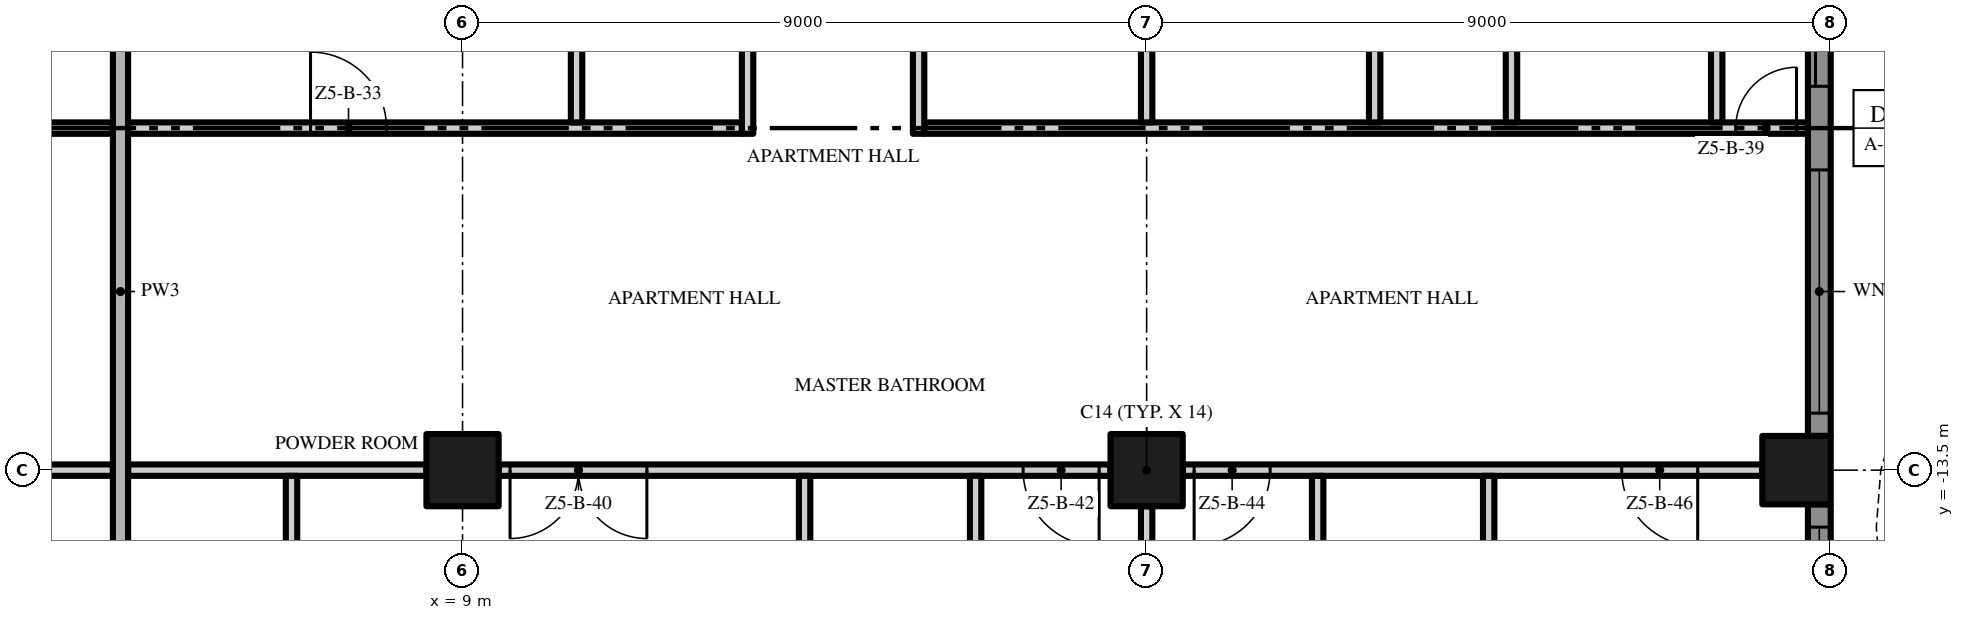
"""IFC4 building model, lengths in metres.
Left out: names, types, materials, properties, quantities, classifications, styles, units other than length and angle.
Written with IfcOpenShell. Run it as: python <this file> out.ifc"""

import sys

from ifc_helpers import new_model, si_unit, direction, frame, frame_2d, origin, origin_2d, place, context, subcontext, project, spatial, polyline, rectangle, outline, extrude, element, fill, save


model = new_model("IFC4")
c1 = context("Model", 3, precision=1e-05, world=origin(), true_north=direction((0.0, 1.0)))
c2 = subcontext(c1, "Body", "Model", "MODEL_VIEW")
j1 = project(units=[si_unit("LENGTHUNIT", "METRE"), si_unit("PLANEANGLEUNIT", "RADIAN")], contexts=[c1])
p1 = place(None, origin())
s1 = spatial("IfcSite", under=j1, at=p1, CompositionType="ELEMENT")
p2 = place(p1, origin())
s2 = spatial("IfcBuilding", under=s1, at=p2, CompositionType="ELEMENT")
p3 = place(p2, frame((0.0, 0.0, 257.8)))
s3 = spatial("IfcBuildingStorey", under=s2, at=p3, CompositionType="ELEMENT", Elevation=257.8)
p4 = place(p3, frame((18.0, -13.5, 0.0), z_axis=(0.0, 0.0, 1.0), x_axis=(1.0, 0.0, 0.0)))
e1 = element("IfcColumn", 1, at=p4, inside=s3, PredefinedType="COLUMN", context=c2, shape_type="SweptSolid", body=[
    extrude(rectangle(XDim=0.95, YDim=0.95, at=origin_2d()), origin(), (0.0, 0.0, 1.0), 3.5),
])
p5 = place(p3, frame((26.55, -13.5, 0.0), z_axis=(0.0, 0.0, 1.0), x_axis=(1.0, 0.0, 0.0)))
e2 = element("IfcColumn", 2, at=p5, inside=s3, PredefinedType="COLUMN", context=c2, shape_type="SweptSolid", body=[
    extrude(rectangle(XDim=0.9, YDim=0.9, at=origin_2d()), origin(), (0.0, 0.0, 1.0), 3.5),
])
p6 = place(p3, frame((9.0, -13.5, 0.0), z_axis=(0.0, 0.0, 1.0), x_axis=(1.0, 0.0, 0.0)))
e3 = element("IfcColumn", 3, at=p6, inside=s3, PredefinedType="COLUMN", context=c2, shape_type="SweptSolid", body=[
    extrude(rectangle(XDim=0.95, YDim=0.95, at=origin_2d()), origin(), (0.0, 0.0, 1.0), 3.5),
])
p7 = place(p3, frame((26.85, -13.95, 0.0), z_axis=(0.0, 0.0, 1.0), x_axis=(0.0, -1.0, 0.0)))
e4 = element("IfcWall", 4, at=p7, inside=s3, PredefinedType="SOLIDWALL", context=c2, shape_type="SweptSolid", body=[
    extrude(rectangle(XDim=3.75, YDim=0.3, at=frame_2d((1.875, 0.0))), origin(), (0.0, 0.0, 1.0), 3.5),
])
p8 = place(p7, frame((0.3, 0.0, 0.45)))
e5 = element("IfcOpeningElement", 5, at=p8, cuts=e4, PredefinedType="OPENING", context=c2, shape_type="SweptSolid", body=[
    extrude(rectangle(XDim=3.15, YDim=2.65, at=frame_2d((1.575, 1.325))), frame((0.0, 0.16, 0.0), z_axis=(0.0, -1.0, 0.0), x_axis=(1.0, 0.0, 0.0)), (0.0, 0.0, 1.0), 0.32),
])
p9 = place(p3, frame((26.85, -4.95, 0.0), z_axis=(0.0, 0.0, 1.0), x_axis=(0.0, -1.0, 0.0)))
e6 = element("IfcWall", 6, at=p9, inside=s3, PredefinedType="SOLIDWALL", context=c2, shape_type="SweptSolid", body=[
    extrude(rectangle(XDim=8.1, YDim=0.3, at=frame_2d((4.05, 0.0))), origin(), (0.0, 0.0, 1.0), 3.5),
])
p10 = place(p9, frame((4.6, 0.0, 0.45)))
e7 = element("IfcOpeningElement", 7, at=p10, cuts=e6, PredefinedType="OPENING", context=c2, shape_type="SweptSolid", body=[
    extrude(rectangle(XDim=3.2, YDim=2.65, at=frame_2d((1.6, 1.325))), frame((0.0, 0.16, 0.0), z_axis=(0.0, -1.0, 0.0), x_axis=(1.0, 0.0, 0.0)), (0.0, 0.0, 1.0), 0.32),
])
p11 = place(p9, frame((0.3, 0.0, 0.0)))
e8 = element("IfcOpeningElement", 8, at=p11, cuts=e6, PredefinedType="OPENING", context=c2, shape_type="SweptSolid", body=[
    extrude(rectangle(XDim=3.2, YDim=2.4, at=frame_2d((1.6, 1.2))), frame((0.0, 0.16, 0.0), z_axis=(0.0, -1.0, 0.0), x_axis=(1.0, 0.0, 0.0)), (0.0, 0.0, 1.0), 0.32),
])
p12 = place(p3, origin())
e9 = element("IfcWall", 9, at=p12, inside=s3, PredefinedType="USERDEFINED", context=c2, shape_type="SweptSolid", body=[
    extrude(outline(polyline([(28.8, -18.0), (28.095, -16.5), (27.659, -15.0), (27.6, -14.25), (27.659, -13.5), (28.095, -12.0), (28.8, -10.5), (29.505, -9.0), (29.941, -7.5), (30.0, -6.75), (29.941, -6.0), (29.505, -4.5), (28.8, -3.0), (28.095, -1.5), (27.659, 0.0), (27.6, 0.75), (27.659, 1.5), (28.095, 3.0), (28.8, 4.5), (29.505, 6.0), (29.941, 7.5), (30.0, 8.25), (29.941, 9.0), (29.505, 10.5), (28.8, 12.0), (28.095, 13.5), (27.659, 15.0), (27.6, 15.75), (27.659, 16.5), (28.095, 18.0), (27.855, 18.07), (27.411, 16.545), (27.349, 15.75), (27.411, 14.955), (27.86, 13.411), (28.574, 11.894), (29.271, 10.411), (29.694, 8.955), (29.749, 8.25), (29.694, 7.545), (29.271, 6.089), (28.574, 4.606), (27.86, 3.089), (27.411, 1.545), (27.349, 0.75), (27.411, -0.045), (27.86, -1.589), (28.574, -3.106), (29.271, -4.589), (29.694, -6.045), (29.749, -6.75), (29.694, -7.455), (29.271, -8.911), (28.574, -10.394), (27.86, -11.911), (27.411, -13.455), (27.349, -14.25), (27.411, -15.045), (27.86, -16.589), (28.574, -18.106), (28.8, -18.0)])), origin(), (0.0, 0.0, 1.0), 0.9),
])
p13 = place(p3, frame((4.4, -13.5, 0.0), z_axis=(0.0, 0.0, 1.0), x_axis=(-1.0, 0.0, 0.0)))
e10 = element("IfcWall", 10, at=p13, inside=s3, PredefinedType="PARTITIONING", context=c2, shape_type="SweptSolid", body=[
    extrude(rectangle(XDim=3.925, YDim=0.15, at=frame_2d((1.962, 0.0))), origin(), (0.0, 0.0, 1.0), 3.5),
])
p14 = place(p13, frame((2.775, 0.0, 0.0)))
e11 = element("IfcOpeningElement", 11, at=p14, cuts=e10, PredefinedType="OPENING", context=c2, shape_type="SweptSolid", body=[
    extrude(rectangle(XDim=1.0, YDim=2.4, at=frame_2d((0.5, 1.2))), frame((0.0, 0.085, 0.0), z_axis=(0.0, -1.0, 0.0), x_axis=(1.0, 0.0, 0.0)), (0.0, 0.0, 1.0), 0.17),
])
p15 = place(p3, frame((4.6, -13.5, 0.0), z_axis=(0.0, 0.0, 1.0), x_axis=(1.0, 0.0, 0.0)))
e12 = element("IfcWall", 12, at=p15, inside=s3, PredefinedType="PARTITIONING", context=c2, shape_type="SweptSolid", body=[
    extrude(rectangle(XDim=3.925, YDim=0.15, at=frame_2d((1.962, 0.0))), origin(), (0.0, 0.0, 1.0), 3.5),
])
p16 = place(p3, frame((17.525, -13.5, 0.0), z_axis=(0.0, 0.0, 1.0), x_axis=(-1.0, 0.0, 0.0)))
e13 = element("IfcWall", 13, at=p16, inside=s3, PredefinedType="PARTITIONING", context=c2, shape_type="SweptSolid", body=[
    extrude(rectangle(XDim=8.05, YDim=0.15, at=frame_2d((4.025, 0.0))), origin(), (0.0, 0.0, 1.0), 3.5),
])
p17 = place(p16, frame((6.1, 0.0, 0.0)))
e14 = element("IfcOpeningElement", 14, at=p17, cuts=e13, PredefinedType="OPENING", context=c2, shape_type="SweptSolid", body=[
    extrude(rectangle(XDim=1.8, YDim=2.4, at=frame_2d((0.9, 1.2))), frame((0.0, 0.085, 0.0), z_axis=(0.0, -1.0, 0.0), x_axis=(1.0, 0.0, 0.0)), (0.0, 0.0, 1.0), 0.17),
])
p18 = place(p16, frame((0.15, 0.0, 0.0)))
e15 = element("IfcOpeningElement", 15, at=p18, cuts=e13, PredefinedType="OPENING", context=c2, shape_type="SweptSolid", body=[
    extrude(rectangle(XDim=1.0, YDim=2.4, at=frame_2d((0.5, 1.2))), frame((0.0, 0.085, 0.0), z_axis=(0.0, -1.0, 0.0), x_axis=(1.0, 0.0, 0.0)), (0.0, 0.0, 1.0), 0.17),
])
p19 = place(p3, frame((26.1, -13.5, 0.0), z_axis=(0.0, 0.0, 1.0), x_axis=(-1.0, 0.0, 0.0)))
e16 = element("IfcWall", 16, at=p19, inside=s3, PredefinedType="PARTITIONING", context=c2, shape_type="SweptSolid", body=[
    extrude(rectangle(XDim=7.625, YDim=0.15, at=frame_2d((3.812, 0.0))), origin(), (0.0, 0.0, 1.0), 3.5),
])
p20 = place(p19, frame((6.475, 0.0, 0.0)))
e17 = element("IfcOpeningElement", 17, at=p20, cuts=e16, PredefinedType="OPENING", context=c2, shape_type="SweptSolid", body=[
    extrude(rectangle(XDim=1.0, YDim=2.4, at=frame_2d((0.5, 1.2))), frame((0.0, 0.085, 0.0), z_axis=(0.0, -1.0, 0.0), x_axis=(1.0, 0.0, 0.0)), (0.0, 0.0, 1.0), 0.17),
])
p21 = place(p19, frame((0.85, 0.0, 0.0)))
e18 = element("IfcOpeningElement", 18, at=p21, cuts=e16, PredefinedType="OPENING", context=c2, shape_type="SweptSolid", body=[
    extrude(rectangle(XDim=1.0, YDim=2.4, at=frame_2d((0.5, 1.2))), frame((0.0, 0.085, 0.0), z_axis=(0.0, -1.0, 0.0), x_axis=(1.0, 0.0, 0.0)), (0.0, 0.0, 1.0), 0.17),
])
p22 = place(p3, frame((-9.225, -9.0, 0.0), z_axis=(0.0, 0.0, 1.0), x_axis=(1.0, 0.0, 0.0)))
e19 = element("IfcWall", 19, at=p22, inside=s3, PredefinedType="PARTITIONING", context=c2, shape_type="SweptSolid", body=[
    extrude(rectangle(XDim=13.625, YDim=0.15, at=frame_2d((6.812, 0.0))), origin(), (0.0, 0.0, 1.0), 3.5),
])
p23 = place(p22, frame((1.0, 0.0, 0.0)))
e20 = element("IfcOpeningElement", 20, at=p23, cuts=e19, PredefinedType="OPENING", context=c2, shape_type="SweptSolid", body=[
    extrude(rectangle(XDim=0.9, YDim=2.1, at=frame_2d((0.45, 1.05))), frame((0.0, 0.085, 0.0), z_axis=(0.0, -1.0, 0.0), x_axis=(1.0, 0.0, 0.0)), (0.0, 0.0, 1.0), 0.17),
])
p24 = place(p22, frame((5.125, 0.0, 0.0)))
e21 = element("IfcOpeningElement", 21, at=p24, cuts=e19, PredefinedType="OPENING", context=c2, shape_type="SweptSolid", body=[
    extrude(rectangle(XDim=0.9, YDim=2.1, at=frame_2d((0.45, 1.05))), frame((0.0, 0.085, 0.0), z_axis=(0.0, -1.0, 0.0), x_axis=(1.0, 0.0, 0.0)), (0.0, 0.0, 1.0), 0.17),
])
p25 = place(p3, frame((4.6, -9.0, 0.0), z_axis=(0.0, 0.0, 1.0), x_axis=(1.0, 0.0, 0.0)))
e22 = element("IfcWall", 22, at=p25, inside=s3, PredefinedType="PARTITIONING", context=c2, shape_type="SweptSolid", body=[
    extrude(rectangle(XDim=8.075, YDim=0.15, at=frame_2d((4.037, 0.0))), origin(), (0.0, 0.0, 1.0), 3.5),
])
p26 = place(p25, frame((2.4, 0.0, 0.0)))
e23 = element("IfcOpeningElement", 23, at=p26, cuts=e22, PredefinedType="OPENING", context=c2, shape_type="SweptSolid", body=[
    extrude(rectangle(XDim=1.0, YDim=2.4, at=frame_2d((0.5, 1.2))), frame((0.0, 0.085, 0.0), z_axis=(0.0, -1.0, 0.0), x_axis=(1.0, 0.0, 0.0)), (0.0, 0.0, 1.0), 0.17),
])
p27 = place(p3, frame((15.075, -9.0, 0.0), z_axis=(0.0, 0.0, 1.0), x_axis=(1.0, 0.0, 0.0)))
e24 = element("IfcWall", 24, at=p27, inside=s3, PredefinedType="PARTITIONING", context=c2, shape_type="SweptSolid", body=[
    extrude(rectangle(XDim=11.625, YDim=0.15, at=frame_2d((5.812, 0.0))), origin(), (0.0, 0.0, 1.0), 3.5),
])
p28 = place(p27, frame((10.675, 0.0, 0.0)))
e25 = element("IfcOpeningElement", 25, at=p28, cuts=e24, PredefinedType="OPENING", context=c2, shape_type="SweptSolid", body=[
    extrude(rectangle(XDim=0.8, YDim=2.0, at=frame_2d((0.4, 1.0))), frame((0.0, 0.085, 0.0), z_axis=(0.0, -1.0, 0.0), x_axis=(1.0, 0.0, 0.0)), (0.0, 0.0, 1.0), 0.17),
])
p29 = place(p3, frame((4.5, -22.2, 0.0), z_axis=(0.0, 0.0, 1.0), x_axis=(0.0, 1.0, 0.0)))
e26 = element("IfcWall", 26, at=p29, inside=s3, PredefinedType="PARTITIONING", context=c2, shape_type="SweptSolid", body=[
    extrude(rectangle(XDim=22.1, YDim=0.2, at=frame_2d((11.05, 0.0))), origin(), (0.0, 0.0, 1.0), 3.5),
])
p30 = place(p3, frame((6.75, -16.575, 0.0), z_axis=(0.0, 0.0, 1.0), x_axis=(0.0, 1.0, 0.0)))
e27 = element("IfcWall", 27, at=p30, inside=s3, PredefinedType="PARTITIONING", context=c2, shape_type="SweptSolid", body=[
    extrude(rectangle(XDim=3.0, YDim=0.15, at=frame_2d((1.5, 0.0))), origin(), (0.0, 0.0, 1.0), 3.5),
])
p31 = place(p30, frame((1.125, 0.0, 0.0)))
e28 = element("IfcOpeningElement", 28, at=p31, cuts=e27, PredefinedType="OPENING", context=c2, shape_type="SweptSolid", body=[
    extrude(rectangle(XDim=0.9, YDim=2.1, at=frame_2d((0.45, 1.05))), frame((0.0, 0.085, 0.0), z_axis=(0.0, -1.0, 0.0), x_axis=(1.0, 0.0, 0.0)), (0.0, 0.0, 1.0), 0.17),
])
p32 = place(p3, frame((10.5, -8.925, 0.0), z_axis=(0.0, 0.0, 1.0), x_axis=(0.0, 1.0, 0.0)))
e29 = element("IfcWall", 29, at=p32, inside=s3, PredefinedType="PARTITIONING", context=c2, shape_type="SweptSolid", body=[
    extrude(rectangle(XDim=4.35, YDim=0.15, at=frame_2d((2.175, 0.0))), origin(), (0.0, 0.0, 1.0), 3.5),
])
p33 = place(p3, frame((12.75, -9.075, 0.0), z_axis=(0.0, 0.0, 1.0), x_axis=(0.0, 1.0, 0.0)))
e30 = element("IfcWall", 30, at=p33, inside=s3, PredefinedType="PARTITIONING", context=c2, shape_type="SweptSolid", body=[
    extrude(rectangle(XDim=4.5, YDim=0.15, at=frame_2d((2.25, 0.0))), origin(), (0.0, 0.0, 1.0), 3.5),
])
p34 = place(p33, frame((1.875, 0.0, 0.0)))
e31 = element("IfcOpeningElement", 31, at=p34, cuts=e30, PredefinedType="OPENING", context=c2, shape_type="SweptSolid", body=[
    extrude(rectangle(XDim=0.9, YDim=2.1, at=frame_2d((0.45, 1.05))), frame((0.0, 0.085, 0.0), z_axis=(0.0, -1.0, 0.0), x_axis=(1.0, 0.0, 0.0)), (0.0, 0.0, 1.0), 0.17),
])
p35 = place(p3, frame((13.5, -22.2, 0.0), z_axis=(0.0, 0.0, 1.0), x_axis=(0.0, 1.0, 0.0)))
e32 = element("IfcWall", 32, at=p35, inside=s3, PredefinedType="PARTITIONING", context=c2, shape_type="SweptSolid", body=[
    extrude(rectangle(XDim=8.625, YDim=0.15, at=frame_2d((4.312, 0.0))), origin(), (0.0, 0.0, 1.0), 3.5),
])
p36 = place(p3, frame((15.0, -9.075, 0.0), z_axis=(0.0, 0.0, 1.0), x_axis=(0.0, 1.0, 0.0)))
e33 = element("IfcWall", 33, at=p36, inside=s3, PredefinedType="PARTITIONING", context=c2, shape_type="SweptSolid", body=[
    extrude(rectangle(XDim=4.65, YDim=0.15, at=frame_2d((2.325, 0.0))), origin(), (0.0, 0.0, 1.0), 3.5),
])
p37 = place(p3, frame((15.75, -16.575, 0.0), z_axis=(0.0, 0.0, 1.0), x_axis=(0.0, 1.0, 0.0)))
e34 = element("IfcWall", 34, at=p37, inside=s3, PredefinedType="PARTITIONING", context=c2, shape_type="SweptSolid", body=[
    extrude(rectangle(XDim=3.0, YDim=0.15, at=frame_2d((1.5, 0.0))), origin(), (0.0, 0.0, 1.0), 3.5),
])
p38 = place(p3, frame((18.0, -21.6, 0.0), z_axis=(0.0, 0.0, 1.0), x_axis=(0.0, 1.0, 0.0)))
e35 = element("IfcWall", 35, at=p38, inside=s3, PredefinedType="PARTITIONING", context=c2, shape_type="SweptSolid", body=[
    extrude(rectangle(XDim=7.625, YDim=0.15, at=frame_2d((3.812, 0.0))), origin(), (0.0, 0.0, 1.0), 3.5),
])
p39 = place(p3, frame((18.0, -8.925, 0.0), z_axis=(0.0, 0.0, 1.0), x_axis=(0.0, 1.0, 0.0)))
e36 = element("IfcWall", 36, at=p39, inside=s3, PredefinedType="PARTITIONING", context=c2, shape_type="SweptSolid", body=[
    extrude(rectangle(XDim=3.95, YDim=0.15, at=frame_2d((1.975, 0.0))), origin(), (0.0, 0.0, 1.0), 3.5),
])
p40 = place(p3, frame((20.25, -16.575, 0.0), z_axis=(0.0, 0.0, 1.0), x_axis=(0.0, 1.0, 0.0)))
e37 = element("IfcWall", 37, at=p40, inside=s3, PredefinedType="PARTITIONING", context=c2, shape_type="SweptSolid", body=[
    extrude(rectangle(XDim=3.0, YDim=0.15, at=frame_2d((1.5, 0.0))), origin(), (0.0, 0.0, 1.0), 3.5),
])
p41 = place(p3, frame((21.0, -8.925, 0.0), z_axis=(0.0, 0.0, 1.0), x_axis=(0.0, 1.0, 0.0)))
e38 = element("IfcWall", 38, at=p41, inside=s3, PredefinedType="PARTITIONING", context=c2, shape_type="SweptSolid", body=[
    extrude(rectangle(XDim=4.35, YDim=0.15, at=frame_2d((2.175, 0.0))), origin(), (0.0, 0.0, 1.0), 3.5),
])
p42 = place(p3, frame((22.5, -17.55, 0.0), z_axis=(0.0, 0.0, 1.0), x_axis=(0.0, 1.0, 0.0)))
e39 = element("IfcWall", 39, at=p42, inside=s3, PredefinedType="PARTITIONING", context=c2, shape_type="SweptSolid", body=[
    extrude(rectangle(XDim=3.975, YDim=0.15, at=frame_2d((1.988, 0.0))), origin(), (0.0, 0.0, 1.0), 3.5),
])
for number, where, z_axis, x_axis in (
    (40, (22.8, -8.925, 0.0), (0.0, 0.0, 1.0), (0.0, 1.0, 0.0)),
    (41, (25.5, -8.925, 0.0), (0.0, 0.0, 1.0), (0.0, 1.0, 0.0)),
):
    element("IfcWall", number, at=place(p3, frame(where, z_axis=z_axis, x_axis=x_axis)), inside=s3, PredefinedType="PARTITIONING", context=c2, shape_type="SweptSolid", body=[
        extrude(rectangle(XDim=4.35, YDim=0.15, at=frame_2d((2.175, 0.0))), origin(), (0.0, 0.0, 1.0), 3.5),
    ])
p43 = place(p8, origin())
e42 = element("IfcWindow", 42, at=p43, inside=s3, PartitioningType="SINGLE_PANEL", PredefinedType="WINDOW", context=c2, shape_type="SweptSolid", body=[
    extrude(rectangle(XDim=3.15, YDim=2.65, at=frame_2d((1.575, 1.325))), frame((0.0, 0.03, 0.0), z_axis=(0.0, -1.0, 0.0), x_axis=(1.0, 0.0, 0.0)), (0.0, 0.0, 1.0), 0.06),
])
fill(e5, e42)
p44 = place(p10, origin())
e43 = element("IfcWindow", 43, at=p44, inside=s3, PartitioningType="SINGLE_PANEL", PredefinedType="WINDOW", context=c2, shape_type="SweptSolid", body=[
    extrude(rectangle(XDim=3.2, YDim=2.65, at=frame_2d((1.6, 1.325))), frame((0.0, 0.03, 0.0), z_axis=(0.0, -1.0, 0.0), x_axis=(1.0, 0.0, 0.0)), (0.0, 0.0, 1.0), 0.06),
])
fill(e7, e43)
p45 = place(p11, origin())
e44 = element("IfcDoor", 44, at=p45, inside=s3, OperationType="SINGLE_SWING_LEFT", PredefinedType="DOOR", context=c2, shape_type="SweptSolid", body=[
    extrude(rectangle(XDim=3.2, YDim=2.4, at=frame_2d((1.6, 1.2))), frame((0.0, 0.025, 0.0), z_axis=(0.0, -1.0, 0.0), x_axis=(1.0, 0.0, 0.0)), (0.0, 0.0, 1.0), 0.05),
])
fill(e8, e44)
p46 = place(p26, origin())
e45 = element("IfcDoor", 45, at=p46, inside=s3, OperationType="SINGLE_SWING_LEFT", PredefinedType="DOOR", context=c2, shape_type="SweptSolid", body=[
    extrude(rectangle(XDim=1.0, YDim=2.4, at=frame_2d((0.5, 1.2))), frame((0.0, 0.025, 0.0), z_axis=(0.0, -1.0, 0.0), x_axis=(1.0, 0.0, 0.0)), (0.0, 0.0, 1.0), 0.05),
])
fill(e23, e45)
p47 = place(p28, origin())
e46 = element("IfcDoor", 46, at=p47, inside=s3, OperationType="SINGLE_SWING_RIGHT", PredefinedType="DOOR", context=c2, shape_type="SweptSolid", body=[
    extrude(rectangle(XDim=0.8, YDim=2.0, at=frame_2d((0.4, 1.0))), frame((0.0, 0.025, 0.0), z_axis=(0.0, -1.0, 0.0), x_axis=(1.0, 0.0, 0.0)), (0.0, 0.0, 1.0), 0.05),
])
fill(e25, e46)
p48 = place(p17, origin())
e47 = element("IfcDoor", 47, at=p48, inside=s3, OperationType="DOUBLE_DOOR_SINGLE_SWING", PredefinedType="DOOR", context=c2, shape_type="SweptSolid", body=[
    extrude(rectangle(XDim=1.8, YDim=2.4, at=frame_2d((0.9, 1.2))), frame((0.0, 0.025, 0.0), z_axis=(0.0, -1.0, 0.0), x_axis=(1.0, 0.0, 0.0)), (0.0, 0.0, 1.0), 0.05),
])
fill(e14, e47)
p49 = place(p18, origin())
e48 = element("IfcDoor", 48, at=p49, inside=s3, OperationType="SINGLE_SWING_LEFT", PredefinedType="DOOR", context=c2, shape_type="SweptSolid", body=[
    extrude(rectangle(XDim=1.0, YDim=2.4, at=frame_2d((0.5, 1.2))), frame((0.0, 0.025, 0.0), z_axis=(0.0, -1.0, 0.0), x_axis=(1.0, 0.0, 0.0)), (0.0, 0.0, 1.0), 0.05),
])
fill(e15, e48)
p50 = place(p20, origin())
e49 = element("IfcDoor", 49, at=p50, inside=s3, OperationType="SINGLE_SWING_RIGHT", PredefinedType="DOOR", context=c2, shape_type="SweptSolid", body=[
    extrude(rectangle(XDim=1.0, YDim=2.4, at=frame_2d((0.5, 1.2))), frame((0.0, 0.025, 0.0), z_axis=(0.0, -1.0, 0.0), x_axis=(1.0, 0.0, 0.0)), (0.0, 0.0, 1.0), 0.05),
])
fill(e17, e49)
p51 = place(p21, origin())
e50 = element("IfcDoor", 50, at=p51, inside=s3, OperationType="SINGLE_SWING_LEFT", PredefinedType="DOOR", context=c2, shape_type="SweptSolid", body=[
    extrude(rectangle(XDim=1.0, YDim=2.4, at=frame_2d((0.5, 1.2))), frame((0.0, 0.025, 0.0), z_axis=(0.0, -1.0, 0.0), x_axis=(1.0, 0.0, 0.0)), (0.0, 0.0, 1.0), 0.05),
])
fill(e18, e50)
save(model, sys.argv[1])
